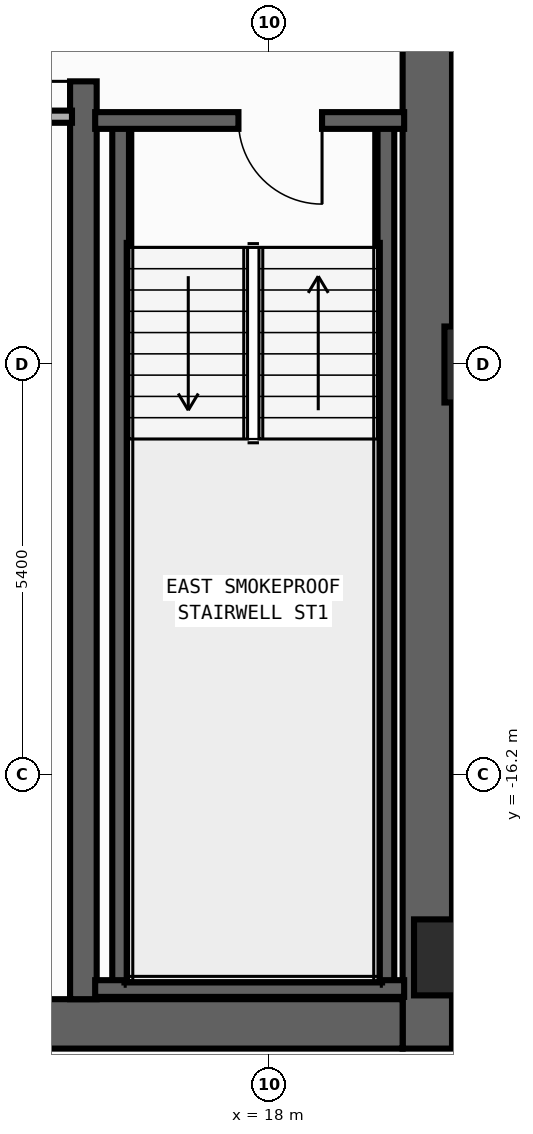
"""IFC4 building model, lengths in metres.
Left out: names, types, materials, properties, quantities, classifications, styles, units other than length and angle.
Written with IfcOpenShell. Run it as: python <this file> out.ifc"""

import sys

from ifc_helpers import new_model, si_unit, direction, frame, frame_2d, origin, origin_2d, place, context, subcontext, project, spatial, rectangle, extrude, element, fill, save


model = new_model("IFC4")
c1 = context("Model", 3, precision=1e-05, world=origin(), true_north=direction((0.0, 1.0)))
c2 = subcontext(c1, "Body", "Model", "MODEL_VIEW")
j1 = project(units=[si_unit("LENGTHUNIT", "METRE"), si_unit("PLANEANGLEUNIT", "RADIAN")], contexts=[c1])
p1 = place(None, origin())
s1 = spatial("IfcSite", under=j1, at=p1, CompositionType="ELEMENT")
p2 = place(p1, origin())
s2 = spatial("IfcBuilding", under=s1, at=p2, CompositionType="ELEMENT")
p3 = place(p2, frame((0.0, 0.0, 203.0)))
s3 = spatial("IfcBuildingStorey", under=s2, at=p3, CompositionType="ELEMENT", Elevation=203.0)
p4 = place(p3, frame((20.075, -19.8, 0.0), z_axis=(0.0, 0.0, 1.0), x_axis=(0.0, 1.0, 0.0)))
e1 = element("IfcWall", 1, at=p4, inside=s3, PredefinedType="SHEAR", context=c2, shape_type="SweptSolid", body=[
    extrude(rectangle(XDim=27.0, YDim=0.65, at=frame_2d((13.5, 0.0))), origin(), (0.0, 0.0, 1.0), 3.54),
])
p5 = place(p3, frame((12.65, -19.475, 0.0), z_axis=(0.0, 0.0, 1.0), x_axis=(1.0, 0.0, 0.0)))
e2 = element("IfcWall", 2, at=p5, inside=s3, PredefinedType="SHEAR", context=c2, shape_type="SweptSolid", body=[
    extrude(rectangle(XDim=7.1, YDim=0.65, at=frame_2d((3.55, 0.0))), origin(), (0.0, 0.0, 1.0), 3.54),
])
p6 = place(p3, frame((15.55, -19.15, 0.0), z_axis=(0.0, 0.0, 1.0), x_axis=(0.0, 1.0, 0.0)))
e3 = element("IfcWall", 3, at=p6, inside=s3, PredefinedType="SHEAR", context=c2, shape_type="SweptSolid", body=[
    extrude(rectangle(XDim=25.7, YDim=0.35, at=frame_2d((12.85, 0.0))), origin(), (0.0, 0.0, 1.0), 3.54),
])
p7 = place(p6, frame((12.075, 0.0, 0.0)))
e4 = element("IfcOpeningElement", 4, at=p7, cuts=e3, PredefinedType="OPENING", context=c2, shape_type="SweptSolid", body=[
    extrude(rectangle(XDim=1.15, YDim=2.2, at=frame_2d((0.575, 1.1))), frame((0.0, 0.185, 0.0), z_axis=(0.0, -1.0, 0.0), x_axis=(1.0, 0.0, 0.0)), (0.0, 0.0, 1.0), 0.37),
])
p8 = place(p6, frame((24.475, 0.0, 0.0)))
e5 = element("IfcOpeningElement", 5, at=p8, cuts=e3, PredefinedType="OPENING", context=c2, shape_type="SweptSolid", body=[
    extrude(rectangle(XDim=0.85, YDim=2.1, at=frame_2d((0.425, 1.05))), frame((0.0, 0.185, 0.0), z_axis=(0.0, -1.0, 0.0), x_axis=(1.0, 0.0, 0.0)), (0.0, 0.0, 1.0), 0.37),
])
for number, where, z_axis, x_axis in (
    (6, (16.04, -19.01, 0.0), (0.0, 0.0, 1.0), (0.0, 1.0, 0.0)),
    (7, (19.53, -19.01, 0.0), (0.0, 0.0, 1.0), (0.0, 1.0, 0.0)),
):
    element("IfcWall", number, at=place(p3, frame(where, z_axis=z_axis, x_axis=x_axis)), inside=s3, PredefinedType="SHEAR", context=c2, shape_type="SweptSolid", body=[
        extrude(rectangle(XDim=11.42, YDim=0.22, at=frame_2d((5.71, 0.0))), origin(), (0.0, 0.0, 1.0), 3.54),
    ])
p9 = place(p3, frame((15.705, -19.01, 0.0), z_axis=(0.0, 0.0, 1.0), x_axis=(1.0, 0.0, 0.0)))
e8 = element("IfcWall", 8, at=p9, inside=s3, PredefinedType="SHEAR", context=c2, shape_type="SweptSolid", body=[
    extrude(rectangle(XDim=4.065, YDim=0.22, at=frame_2d((2.032, 0.0))), origin(), (0.0, 0.0, 1.0), 3.54),
])
p10 = place(p3, frame((19.77, -7.59, 0.0), z_axis=(0.0, 0.0, 1.0), x_axis=(-1.0, 0.0, 0.0)))
e9 = element("IfcWall", 9, at=p10, inside=s3, PredefinedType="SHEAR", context=c2, shape_type="SweptSolid", body=[
    extrude(rectangle(XDim=4.065, YDim=0.22, at=frame_2d((2.032, 0.0))), origin(), (0.0, 0.0, 1.0), 3.54),
])
p11 = place(p10, frame((1.08, 0.0, 0.0)))
e10 = element("IfcOpeningElement", 10, at=p11, cuts=e9, PredefinedType="OPENING", context=c2, shape_type="SweptSolid", body=[
    extrude(rectangle(XDim=1.1, YDim=2.2, at=frame_2d((0.55, 1.1))), frame((0.0, 0.12, 0.0), z_axis=(0.0, -1.0, 0.0), x_axis=(1.0, 0.0, 0.0)), (0.0, 0.0, 1.0), 0.24),
])
for number, where, z_axis, x_axis in (
    (11, (20.4, -18.6, 0.0), (0.0, 0.0, 1.0), (1.0, 0.0, 0.0)),
    (12, (20.8, -10.8, 0.0), (0.0, 0.0, 1.0), (1.0, 0.0, 0.0)),
):
    element("IfcColumn", number, at=place(p3, frame(where, z_axis=z_axis, x_axis=x_axis)), inside=s3, PredefinedType="COLUMN", context=c2, shape_type="SweptSolid", body=[
        extrude(rectangle(XDim=1.0, YDim=1.0, at=origin_2d()), origin(), (0.0, 0.0, 1.0), 3.8),
    ])
p12 = place(p3, frame((12.8, -7.54, 0.0), z_axis=(0.0, 0.0, 1.0), x_axis=(1.0, 0.0, 0.0)))
e13 = element("IfcWall", 13, at=p12, inside=s3, PredefinedType="STANDARD", context=c2, shape_type="SweptSolid", body=[
    extrude(rectangle(XDim=2.6, YDim=0.16, at=frame_2d((1.3, 0.0))), origin(), (0.0, 0.0, 1.0), 3.54),
])
p13 = place(p11, origin())
e14 = element("IfcDoor", 14, at=p13, inside=s3, OperationType="SINGLE_SWING_LEFT", PredefinedType="DOOR", context=c2, shape_type="SweptSolid", body=[
    extrude(rectangle(XDim=1.1, YDim=2.2, at=frame_2d((0.55, 1.1))), frame((0.0, 0.025, 0.0), z_axis=(0.0, -1.0, 0.0), x_axis=(1.0, 0.0, 0.0)), (0.0, 0.0, 1.0), 0.05),
])
fill(e10, e14)
p14 = place(p7, origin())
e15 = element("IfcDoor", 15, at=p14, inside=s3, OperationType="SINGLE_SWING_LEFT", PredefinedType="DOOR", context=c2, shape_type="SweptSolid", body=[
    extrude(rectangle(XDim=1.15, YDim=2.2, at=frame_2d((0.575, 1.1))), frame((0.0, 0.025, 0.0), z_axis=(0.0, -1.0, 0.0), x_axis=(1.0, 0.0, 0.0)), (0.0, 0.0, 1.0), 0.05),
])
fill(e4, e15)
save(model, sys.argv[1])
